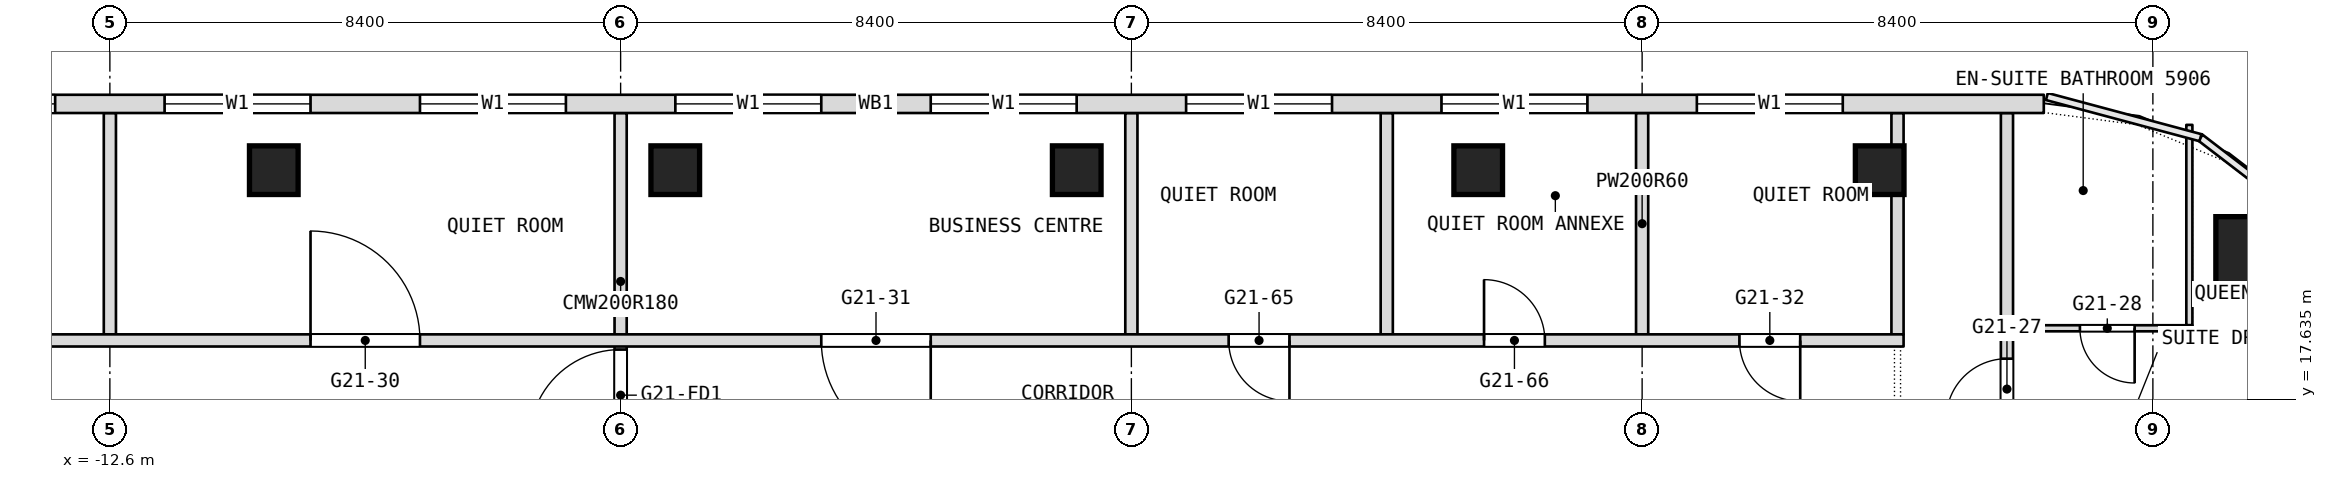
"""IFC4 building model, lengths in metres.
Left out: names, types, materials, properties, quantities, classifications, styles, units other than length and angle.
Written with IfcOpenShell. Run it as: python <this file> out.ifc"""

import sys

from ifc_helpers import new_model, si_unit, direction, frame, frame_2d, origin, origin_2d, place, context, subcontext, project, spatial, rectangle, extrude, element, fill, save


model = new_model("IFC4")
c1 = context("Model", 3, precision=1e-05, world=origin(), true_north=direction((0.0, 1.0)))
c2 = subcontext(c1, "Body", "Model", "MODEL_VIEW")
j1 = project(units=[si_unit("LENGTHUNIT", "METRE"), si_unit("PLANEANGLEUNIT", "RADIAN")], contexts=[c1])
p1 = place(None, origin())
s1 = spatial("IfcSite", under=j1, at=p1, CompositionType="ELEMENT")
p2 = place(p1, origin())
s2 = spatial("IfcBuilding", under=s1, at=p2, CompositionType="ELEMENT")
p3 = place(p2, frame((0.0, 0.0, 248.9)))
s3 = spatial("IfcBuildingStorey", under=s2, at=p3, CompositionType="ELEMENT", Elevation=248.9)
p4 = place(p3, frame((22.736, 19.936, 0.0), z_axis=(0.0, 0.0, 1.0), x_axis=(1.0, 0.0, 0.0)))
e1 = element("IfcColumn", 1, at=p4, inside=s3, PredefinedType="COLUMN", context=c2, shape_type="SweptSolid", body=[
    extrude(rectangle(XDim=1.4, YDim=1.4, at=origin_2d()), origin(), (0.0, 0.0, 1.0), 3.6),
])
for number, where, z_axis, x_axis in (
    (2, (-9.904, 21.4, 0.0), (0.0, 0.0, 1.0), (1.0, 0.0, 0.0)),
    (3, (-3.302, 21.4, 0.0), (0.0, 0.0, 1.0), (1.0, 0.0, 0.0)),
    (4, (3.302, 21.4, 0.0), (0.0, 0.0, 1.0), (1.0, 0.0, 0.0)),
    (5, (9.904, 21.4, 0.0), (0.0, 0.0, 1.0), (1.0, 0.0, 0.0)),
    (6, (16.507, 21.4, 0.0), (0.0, 0.0, 1.0), (1.0, 0.0, 0.0)),
):
    element("IfcColumn", number, at=place(p3, frame(where, z_axis=z_axis, x_axis=x_axis)), inside=s3, PredefinedType="COLUMN", context=c2, shape_type="SweptSolid", body=[
        extrude(rectangle(XDim=0.8, YDim=0.8, at=origin_2d()), origin(), (0.0, 0.0, 1.0), 3.6),
    ])
p5 = place(p3, frame((21.6, 18.85, 0.0), z_axis=(0.0, 0.0, 1.0), x_axis=(0.0, 1.0, 0.0)))
e7 = element("IfcWall", 7, at=p5, inside=s3, PredefinedType="PARTITIONING", context=c2, shape_type="SweptSolid", body=[
    extrude(rectangle(XDim=3.295, YDim=0.1, at=frame_2d((1.647, 0.0))), origin(), (0.0, 0.0, 1.0), 3.3),
])
p6 = place(p3, frame((18.6, -26.751, 0.0), z_axis=(0.0, 0.0, 1.0), x_axis=(0.0, 1.0, 0.0)))
e8 = element("IfcWall", 8, at=p6, inside=s3, PredefinedType="PARTITIONING", context=c2, shape_type="SweptSolid", body=[
    extrude(rectangle(XDim=49.091, YDim=0.2, at=frame_2d((24.545, 0.0))), origin(), (0.0, 0.0, 1.0), 3.3),
])
p7 = place(p6, frame((4.226, 0.0, 0.0)))
e9 = element("IfcOpeningElement", 9, at=p7, cuts=e8, PredefinedType="OPENING", context=c2, shape_type="SweptSolid", body=[
    extrude(rectangle(XDim=1.8, YDim=2.1, at=frame_2d((0.9, 1.05))), frame((0.0, 0.1, 0.0), z_axis=(0.0, -1.0, 0.0), x_axis=(1.0, 0.0, 0.0)), (0.0, 0.0, 1.0), 0.2),
])
p8 = place(p6, frame((13.251, 0.0, 0.0)))
e10 = element("IfcOpeningElement", 10, at=p8, cuts=e8, PredefinedType="OPENING", context=c2, shape_type="SweptSolid", body=[
    extrude(rectangle(XDim=1.8, YDim=2.1, at=frame_2d((0.9, 1.05))), frame((0.0, 0.1, 0.0), z_axis=(0.0, -1.0, 0.0), x_axis=(1.0, 0.0, 0.0)), (0.0, 0.0, 1.0), 0.2),
])
p9 = place(p6, frame((21.151, 0.0, 0.0)))
e11 = element("IfcOpeningElement", 11, at=p9, cuts=e8, PredefinedType="OPENING", context=c2, shape_type="SweptSolid", body=[
    extrude(rectangle(XDim=1.0, YDim=2.1, at=frame_2d((0.5, 1.05))), frame((0.0, 0.1, 0.0), z_axis=(0.0, -1.0, 0.0), x_axis=(1.0, 0.0, 0.0)), (0.0, 0.0, 1.0), 0.2),
])
p10 = place(p6, frame((22.951, 0.0, 0.0)))
e12 = element("IfcOpeningElement", 12, at=p10, cuts=e8, PredefinedType="OPENING", context=c2, shape_type="SweptSolid", body=[
    extrude(rectangle(XDim=1.0, YDim=2.1, at=frame_2d((0.5, 1.05))), frame((0.0, 0.1, 0.0), z_axis=(0.0, -1.0, 0.0), x_axis=(1.0, 0.0, 0.0)), (0.0, 0.0, 1.0), 0.2),
])
p11 = place(p6, frame((27.151, 0.0, 0.0)))
e13 = element("IfcOpeningElement", 13, at=p11, cuts=e8, PredefinedType="OPENING", context=c2, shape_type="SweptSolid", body=[
    extrude(rectangle(XDim=1.0, YDim=2.1, at=frame_2d((0.5, 1.05))), frame((0.0, 0.1, 0.0), z_axis=(0.0, -1.0, 0.0), x_axis=(1.0, 0.0, 0.0)), (0.0, 0.0, 1.0), 0.2),
])
p12 = place(p6, frame((33.751, 0.0, 0.0)))
e14 = element("IfcOpeningElement", 14, at=p12, cuts=e8, PredefinedType="OPENING", context=c2, shape_type="SweptSolid", body=[
    extrude(rectangle(XDim=1.0, YDim=2.1, at=frame_2d((0.5, 1.05))), frame((0.0, 0.1, 0.0), z_axis=(0.0, -1.0, 0.0), x_axis=(1.0, 0.0, 0.0)), (0.0, 0.0, 1.0), 0.2),
])
p13 = place(p6, frame((38.851, 0.0, 0.0)))
e15 = element("IfcOpeningElement", 15, at=p13, cuts=e8, PredefinedType="OPENING", context=c2, shape_type="SweptSolid", body=[
    extrude(rectangle(XDim=1.1, YDim=2.1, at=frame_2d((0.55, 1.05))), frame((0.0, 0.1, 0.0), z_axis=(0.0, -1.0, 0.0), x_axis=(1.0, 0.0, 0.0)), (0.0, 0.0, 1.0), 0.2),
])
p14 = place(p6, frame((44.051, 0.0, 0.0)))
e16 = element("IfcOpeningElement", 16, at=p14, cuts=e8, PredefinedType="OPENING", context=c2, shape_type="SweptSolid", body=[
    extrude(rectangle(XDim=1.0, YDim=2.1, at=frame_2d((0.5, 1.05))), frame((0.0, 0.1, 0.0), z_axis=(0.0, -1.0, 0.0), x_axis=(1.0, 0.0, 0.0)), (0.0, 0.0, 1.0), 0.2),
])
for number, where, z_axis, x_axis in (
    (17, (16.8, 18.7, 0.0), (0.0, 0.0, 1.0), (0.0, 1.0, 0.0)),
    (18, (12.6, 18.7, 0.0), (0.0, 0.0, 1.0), (0.0, 1.0, 0.0)),
    (19, (8.4, 18.7, 0.0), (0.0, 0.0, 1.0), (0.0, 1.0, 0.0)),
    (20, (4.2, 18.7, 0.0), (0.0, 0.0, 1.0), (0.0, 1.0, 0.0)),
):
    element("IfcWall", number, at=place(p3, frame(where, z_axis=z_axis, x_axis=x_axis)), inside=s3, PredefinedType="PARTITIONING", context=c2, shape_type="SweptSolid", body=[
        extrude(rectangle(XDim=3.64, YDim=0.2, at=frame_2d((1.82, 0.0))), origin(), (0.0, 0.0, 1.0), 3.3),
    ])
p15 = place(p3, frame((-4.2, 16.8, 0.0), z_axis=(0.0, 0.0, 1.0), x_axis=(0.0, 1.0, 0.0)))
e21 = element("IfcWall", 21, at=p15, inside=s3, PredefinedType="PARTITIONING", context=c2, shape_type="SweptSolid", body=[
    extrude(rectangle(XDim=5.54, YDim=0.2, at=frame_2d((2.77, 0.0))), origin(), (0.0, 0.0, 1.0), 3.3),
])
p16 = place(p15, frame((0.15, 0.0, 0.0)))
e22 = element("IfcOpeningElement", 22, at=p16, cuts=e21, PredefinedType="OPENING", context=c2, shape_type="SweptSolid", body=[
    extrude(rectangle(XDim=1.5, YDim=2.1, at=frame_2d((0.75, 1.05))), frame((0.0, 0.1, 0.0), z_axis=(0.0, -1.0, 0.0), x_axis=(1.0, 0.0, 0.0)), (0.0, 0.0, 1.0), 0.2),
])
p17 = place(p3, frame((-12.6, 18.7, 0.0), z_axis=(0.0, 0.0, 1.0), x_axis=(0.0, 1.0, 0.0)))
e23 = element("IfcWall", 23, at=p17, inside=s3, PredefinedType="PARTITIONING", context=c2, shape_type="SweptSolid", body=[
    extrude(rectangle(XDim=3.64, YDim=0.2, at=frame_2d((1.82, 0.0))), origin(), (0.0, 0.0, 1.0), 3.3),
])
p18 = place(p3, frame((-16.9, 18.6, 0.0), z_axis=(0.0, 0.0, 1.0), x_axis=(1.0, 0.0, 0.0)))
e24 = element("IfcWall", 24, at=p18, inside=s3, PredefinedType="PARTITIONING", context=c2, shape_type="SweptSolid", body=[
    extrude(rectangle(XDim=33.8, YDim=0.2, at=frame_2d((16.9, 0.0))), origin(), (0.0, 0.0, 1.0), 3.3),
])
p19 = place(p18, frame((1.7, 0.0, 0.0)))
e25 = element("IfcOpeningElement", 25, at=p19, cuts=e24, PredefinedType="OPENING", context=c2, shape_type="SweptSolid", body=[
    extrude(rectangle(XDim=1.0, YDim=2.1, at=frame_2d((0.5, 1.05))), frame((0.0, 0.1, 0.0), z_axis=(0.0, -1.0, 0.0), x_axis=(1.0, 0.0, 0.0)), (0.0, 0.0, 1.0), 0.2),
])
p20 = place(p18, frame((7.6, 0.0, 0.0)))
e26 = element("IfcOpeningElement", 26, at=p20, cuts=e24, PredefinedType="OPENING", context=c2, shape_type="SweptSolid", body=[
    extrude(rectangle(XDim=1.8, YDim=2.1, at=frame_2d((0.9, 1.05))), frame((0.0, 0.1, 0.0), z_axis=(0.0, -1.0, 0.0), x_axis=(1.0, 0.0, 0.0)), (0.0, 0.0, 1.0), 0.2),
])
p21 = place(p18, frame((16.0, 0.0, 0.0)))
e27 = element("IfcOpeningElement", 27, at=p21, cuts=e24, PredefinedType="OPENING", context=c2, shape_type="SweptSolid", body=[
    extrude(rectangle(XDim=1.8, YDim=2.1, at=frame_2d((0.9, 1.05))), frame((0.0, 0.1, 0.0), z_axis=(0.0, -1.0, 0.0), x_axis=(1.0, 0.0, 0.0)), (0.0, 0.0, 1.0), 0.2),
])
p22 = place(p18, frame((31.1, 0.0, 0.0)))
e28 = element("IfcOpeningElement", 28, at=p22, cuts=e24, PredefinedType="OPENING", context=c2, shape_type="SweptSolid", body=[
    extrude(rectangle(XDim=1.0, YDim=2.1, at=frame_2d((0.5, 1.05))), frame((0.0, 0.1, 0.0), z_axis=(0.0, -1.0, 0.0), x_axis=(1.0, 0.0, 0.0)), (0.0, 0.0, 1.0), 0.2),
])
p23 = place(p18, frame((22.7, 0.0, 0.0)))
e29 = element("IfcOpeningElement", 29, at=p23, cuts=e24, PredefinedType="OPENING", context=c2, shape_type="SweptSolid", body=[
    extrude(rectangle(XDim=1.0, YDim=2.1, at=frame_2d((0.5, 1.05))), frame((0.0, 0.1, 0.0), z_axis=(0.0, -1.0, 0.0), x_axis=(1.0, 0.0, 0.0)), (0.0, 0.0, 1.0), 0.2),
])
p24 = place(p18, frame((26.9, 0.0, 0.0)))
e30 = element("IfcOpeningElement", 30, at=p24, cuts=e24, PredefinedType="OPENING", context=c2, shape_type="SweptSolid", body=[
    extrude(rectangle(XDim=1.0, YDim=2.1, at=frame_2d((0.5, 1.05))), frame((0.0, 0.1, 0.0), z_axis=(0.0, -1.0, 0.0), x_axis=(1.0, 0.0, 0.0)), (0.0, 0.0, 1.0), 0.2),
])
p25 = place(p3, frame((18.7, 18.8, 0.0), z_axis=(0.0, 0.0, 1.0), x_axis=(1.0, 0.0, 0.0)))
e31 = element("IfcWall", 31, at=p25, inside=s3, PredefinedType="PARTITIONING", context=c2, shape_type="SweptSolid", body=[
    extrude(rectangle(XDim=2.95, YDim=0.1, at=frame_2d((1.475, 0.0))), origin(), (0.0, 0.0, 1.0), 3.3),
])
p26 = place(p25, frame((1.1, 0.0, 0.0)))
e32 = element("IfcOpeningElement", 32, at=p26, cuts=e31, PredefinedType="OPENING", context=c2, shape_type="SweptSolid", body=[
    extrude(rectangle(XDim=0.9, YDim=2.1, at=frame_2d((0.45, 1.05))), frame((0.0, 0.05, 0.0), z_axis=(0.0, -1.0, 0.0), x_axis=(1.0, 0.0, 0.0)), (0.0, 0.0, 1.0), 0.1),
])
p27 = place(p3, frame((19.206, 22.49, 0.0), z_axis=(0.0, 0.0, 1.0), x_axis=(-1.0, 0.0, 0.0)))
e33 = element("IfcWall", 33, at=p27, inside=s3, PredefinedType="NOTDEFINED", context=c2, shape_type="SweptSolid", body=[
    extrude(rectangle(XDim=38.412, YDim=0.3, at=frame_2d((19.206, 0.0))), origin(), (0.0, 0.0, 1.0), 3.6),
])
p28 = place(p27, frame((3.306, 0.0, 0.9)))
e34 = element("IfcOpeningElement", 34, at=p28, cuts=e33, PredefinedType="OPENING", context=c2, shape_type="SweptSolid", body=[
    extrude(rectangle(XDim=2.4, YDim=2.1, at=frame_2d((1.2, 1.05))), frame((0.0, 0.15, 0.0), z_axis=(0.0, -1.0, 0.0), x_axis=(1.0, 0.0, 0.0)), (0.0, 0.0, 1.0), 0.3),
])
p29 = place(p27, frame((7.506, 0.0, 0.9)))
e35 = element("IfcOpeningElement", 35, at=p29, cuts=e33, PredefinedType="OPENING", context=c2, shape_type="SweptSolid", body=[
    extrude(rectangle(XDim=2.4, YDim=2.1, at=frame_2d((1.2, 1.05))), frame((0.0, 0.15, 0.0), z_axis=(0.0, -1.0, 0.0), x_axis=(1.0, 0.0, 0.0)), (0.0, 0.0, 1.0), 0.3),
])
p30 = place(p27, frame((11.706, 0.0, 0.9)))
e36 = element("IfcOpeningElement", 36, at=p30, cuts=e33, PredefinedType="OPENING", context=c2, shape_type="SweptSolid", body=[
    extrude(rectangle(XDim=2.4, YDim=2.1, at=frame_2d((1.2, 1.05))), frame((0.0, 0.15, 0.0), z_axis=(0.0, -1.0, 0.0), x_axis=(1.0, 0.0, 0.0)), (0.0, 0.0, 1.0), 0.3),
])
p31 = place(p27, frame((15.906, 0.0, 0.9)))
e37 = element("IfcOpeningElement", 37, at=p31, cuts=e33, PredefinedType="OPENING", context=c2, shape_type="SweptSolid", body=[
    extrude(rectangle(XDim=2.4, YDim=2.1, at=frame_2d((1.2, 1.05))), frame((0.0, 0.15, 0.0), z_axis=(0.0, -1.0, 0.0), x_axis=(1.0, 0.0, 0.0)), (0.0, 0.0, 1.0), 0.3),
])
p32 = place(p27, frame((20.106, 0.0, 0.9)))
e38 = element("IfcOpeningElement", 38, at=p32, cuts=e33, PredefinedType="OPENING", context=c2, shape_type="SweptSolid", body=[
    extrude(rectangle(XDim=2.4, YDim=2.1, at=frame_2d((1.2, 1.05))), frame((0.0, 0.15, 0.0), z_axis=(0.0, -1.0, 0.0), x_axis=(1.0, 0.0, 0.0)), (0.0, 0.0, 1.0), 0.3),
])
p33 = place(p27, frame((24.306, 0.0, 0.9)))
e39 = element("IfcOpeningElement", 39, at=p33, cuts=e33, PredefinedType="OPENING", context=c2, shape_type="SweptSolid", body=[
    extrude(rectangle(XDim=2.4, YDim=2.1, at=frame_2d((1.2, 1.05))), frame((0.0, 0.15, 0.0), z_axis=(0.0, -1.0, 0.0), x_axis=(1.0, 0.0, 0.0)), (0.0, 0.0, 1.0), 0.3),
])
p34 = place(p27, frame((28.506, 0.0, 0.9)))
e40 = element("IfcOpeningElement", 40, at=p34, cuts=e33, PredefinedType="OPENING", context=c2, shape_type="SweptSolid", body=[
    extrude(rectangle(XDim=2.4, YDim=2.1, at=frame_2d((1.2, 1.05))), frame((0.0, 0.15, 0.0), z_axis=(0.0, -1.0, 0.0), x_axis=(1.0, 0.0, 0.0)), (0.0, 0.0, 1.0), 0.3),
])
p35 = place(p27, frame((32.706, 0.0, 0.9)))
e41 = element("IfcOpeningElement", 41, at=p35, cuts=e33, PredefinedType="OPENING", context=c2, shape_type="SweptSolid", body=[
    extrude(rectangle(XDim=2.4, YDim=2.1, at=frame_2d((1.2, 1.05))), frame((0.0, 0.15, 0.0), z_axis=(0.0, -1.0, 0.0), x_axis=(1.0, 0.0, 0.0)), (0.0, 0.0, 1.0), 0.3),
])
p36 = place(p14, origin())
e42 = element("IfcDoor", 42, at=p36, inside=s3, OperationType="SINGLE_SWING_LEFT", PredefinedType="DOOR", context=c2, shape_type="SweptSolid", body=[
    extrude(rectangle(XDim=1.0, YDim=2.1, at=frame_2d((0.5, 1.05))), frame((0.0, 0.025, 0.0), z_axis=(0.0, -1.0, 0.0), x_axis=(1.0, 0.0, 0.0)), (0.0, 0.0, 1.0), 0.05),
])
fill(e16, e42)
p37 = place(p20, origin())
e43 = element("IfcDoor", 43, at=p37, inside=s3, OperationType="DOUBLE_DOOR_SINGLE_SWING", PredefinedType="DOOR", context=c2, shape_type="SweptSolid", body=[
    extrude(rectangle(XDim=1.8, YDim=2.1, at=frame_2d((0.9, 1.05))), frame((0.0, 0.025, 0.0), z_axis=(0.0, -1.0, 0.0), x_axis=(1.0, 0.0, 0.0)), (0.0, 0.0, 1.0), 0.05),
])
fill(e26, e43)
p38 = place(p21, origin())
e44 = element("IfcDoor", 44, at=p38, inside=s3, OperationType="DOUBLE_DOOR_SINGLE_SWING", PredefinedType="DOOR", context=c2, shape_type="SweptSolid", body=[
    extrude(rectangle(XDim=1.8, YDim=2.1, at=frame_2d((0.9, 1.05))), frame((0.0, 0.025, 0.0), z_axis=(0.0, -1.0, 0.0), x_axis=(1.0, 0.0, 0.0)), (0.0, 0.0, 1.0), 0.05),
])
fill(e27, e44)
p39 = place(p22, origin())
e45 = element("IfcDoor", 45, at=p39, inside=s3, OperationType="SINGLE_SWING_RIGHT", PredefinedType="DOOR", context=c2, shape_type="SweptSolid", body=[
    extrude(rectangle(XDim=1.0, YDim=2.1, at=frame_2d((0.5, 1.05))), frame((0.0, 0.025, 0.0), z_axis=(0.0, -1.0, 0.0), x_axis=(1.0, 0.0, 0.0)), (0.0, 0.0, 1.0), 0.05),
])
fill(e28, e45)
p40 = place(p23, origin())
e46 = element("IfcDoor", 46, at=p40, inside=s3, OperationType="SINGLE_SWING_LEFT", PredefinedType="DOOR", context=c2, shape_type="SweptSolid", body=[
    extrude(rectangle(XDim=1.0, YDim=2.1, at=frame_2d((0.5, 1.05))), frame((0.0, 0.025, 0.0), z_axis=(0.0, -1.0, 0.0), x_axis=(1.0, 0.0, 0.0)), (0.0, 0.0, 1.0), 0.05),
])
fill(e29, e46)
p41 = place(p24, origin())
e47 = element("IfcDoor", 47, at=p41, inside=s3, OperationType="SINGLE_SWING_RIGHT", PredefinedType="DOOR", context=c2, shape_type="SweptSolid", body=[
    extrude(rectangle(XDim=1.0, YDim=2.1, at=frame_2d((0.5, 1.05))), frame((0.0, 0.025, 0.0), z_axis=(0.0, -1.0, 0.0), x_axis=(1.0, 0.0, 0.0)), (0.0, 0.0, 1.0), 0.05),
])
fill(e30, e47)
p42 = place(p26, origin())
e48 = element("IfcDoor", 48, at=p42, inside=s3, OperationType="SINGLE_SWING_RIGHT", PredefinedType="DOOR", context=c2, shape_type="SweptSolid", body=[
    extrude(rectangle(XDim=0.9, YDim=2.1, at=frame_2d((0.45, 1.05))), frame((0.0, 0.025, 0.0), z_axis=(0.0, -1.0, 0.0), x_axis=(1.0, 0.0, 0.0)), (0.0, 0.0, 1.0), 0.05),
])
fill(e32, e48)
p43 = place(p28, origin())
e49 = element("IfcWindow", 49, at=p43, inside=s3, PartitioningType="SINGLE_PANEL", PredefinedType="WINDOW", context=c2, shape_type="SweptSolid", body=[
    extrude(rectangle(XDim=2.4, YDim=2.1, at=frame_2d((1.2, 1.05))), frame((0.0, 0.03, 0.0), z_axis=(0.0, -1.0, 0.0), x_axis=(1.0, 0.0, 0.0)), (0.0, 0.0, 1.0), 0.06),
])
fill(e34, e49)
p44 = place(p29, origin())
e50 = element("IfcWindow", 50, at=p44, inside=s3, PartitioningType="SINGLE_PANEL", PredefinedType="WINDOW", context=c2, shape_type="SweptSolid", body=[
    extrude(rectangle(XDim=2.4, YDim=2.1, at=frame_2d((1.2, 1.05))), frame((0.0, 0.03, 0.0), z_axis=(0.0, -1.0, 0.0), x_axis=(1.0, 0.0, 0.0)), (0.0, 0.0, 1.0), 0.06),
])
fill(e35, e50)
p45 = place(p30, origin())
e51 = element("IfcWindow", 51, at=p45, inside=s3, PartitioningType="SINGLE_PANEL", PredefinedType="WINDOW", context=c2, shape_type="SweptSolid", body=[
    extrude(rectangle(XDim=2.4, YDim=2.1, at=frame_2d((1.2, 1.05))), frame((0.0, 0.03, 0.0), z_axis=(0.0, -1.0, 0.0), x_axis=(1.0, 0.0, 0.0)), (0.0, 0.0, 1.0), 0.06),
])
fill(e36, e51)
p46 = place(p31, origin())
e52 = element("IfcWindow", 52, at=p46, inside=s3, PartitioningType="SINGLE_PANEL", PredefinedType="WINDOW", context=c2, shape_type="SweptSolid", body=[
    extrude(rectangle(XDim=2.4, YDim=2.1, at=frame_2d((1.2, 1.05))), frame((0.0, 0.03, 0.0), z_axis=(0.0, -1.0, 0.0), x_axis=(1.0, 0.0, 0.0)), (0.0, 0.0, 1.0), 0.06),
])
fill(e37, e52)
p47 = place(p32, origin())
e53 = element("IfcWindow", 53, at=p47, inside=s3, PartitioningType="SINGLE_PANEL", PredefinedType="WINDOW", context=c2, shape_type="SweptSolid", body=[
    extrude(rectangle(XDim=2.4, YDim=2.1, at=frame_2d((1.2, 1.05))), frame((0.0, 0.03, 0.0), z_axis=(0.0, -1.0, 0.0), x_axis=(1.0, 0.0, 0.0)), (0.0, 0.0, 1.0), 0.06),
])
fill(e38, e53)
p48 = place(p33, origin())
e54 = element("IfcWindow", 54, at=p48, inside=s3, PartitioningType="SINGLE_PANEL", PredefinedType="WINDOW", context=c2, shape_type="SweptSolid", body=[
    extrude(rectangle(XDim=2.4, YDim=2.1, at=frame_2d((1.2, 1.05))), frame((0.0, 0.03, 0.0), z_axis=(0.0, -1.0, 0.0), x_axis=(1.0, 0.0, 0.0)), (0.0, 0.0, 1.0), 0.06),
])
fill(e39, e54)
p49 = place(p34, origin())
e55 = element("IfcWindow", 55, at=p49, inside=s3, PartitioningType="SINGLE_PANEL", PredefinedType="WINDOW", context=c2, shape_type="SweptSolid", body=[
    extrude(rectangle(XDim=2.4, YDim=2.1, at=frame_2d((1.2, 1.05))), frame((0.0, 0.03, 0.0), z_axis=(0.0, -1.0, 0.0), x_axis=(1.0, 0.0, 0.0)), (0.0, 0.0, 1.0), 0.06),
])
fill(e40, e55)
p50 = place(p35, origin())
e56 = element("IfcWindow", 56, at=p50, inside=s3, PartitioningType="SINGLE_PANEL", PredefinedType="WINDOW", context=c2, shape_type="SweptSolid", body=[
    extrude(rectangle(XDim=2.4, YDim=2.1, at=frame_2d((1.2, 1.05))), frame((0.0, 0.03, 0.0), z_axis=(0.0, -1.0, 0.0), x_axis=(1.0, 0.0, 0.0)), (0.0, 0.0, 1.0), 0.06),
])
fill(e41, e56)
p51 = place(p16, origin())
e57 = element("IfcDoor", 57, at=p51, inside=s3, OperationType="DOUBLE_DOOR_DOUBLE_SWING", PredefinedType="DOOR", context=c2, shape_type="SweptSolid", body=[
    extrude(rectangle(XDim=1.5, YDim=2.1, at=frame_2d((0.75, 1.05))), frame((0.0, 0.025, 0.0), z_axis=(0.0, -1.0, 0.0), x_axis=(1.0, 0.0, 0.0)), (0.0, 0.0, 1.0), 0.05),
])
fill(e22, e57)
save(model, sys.argv[1])
